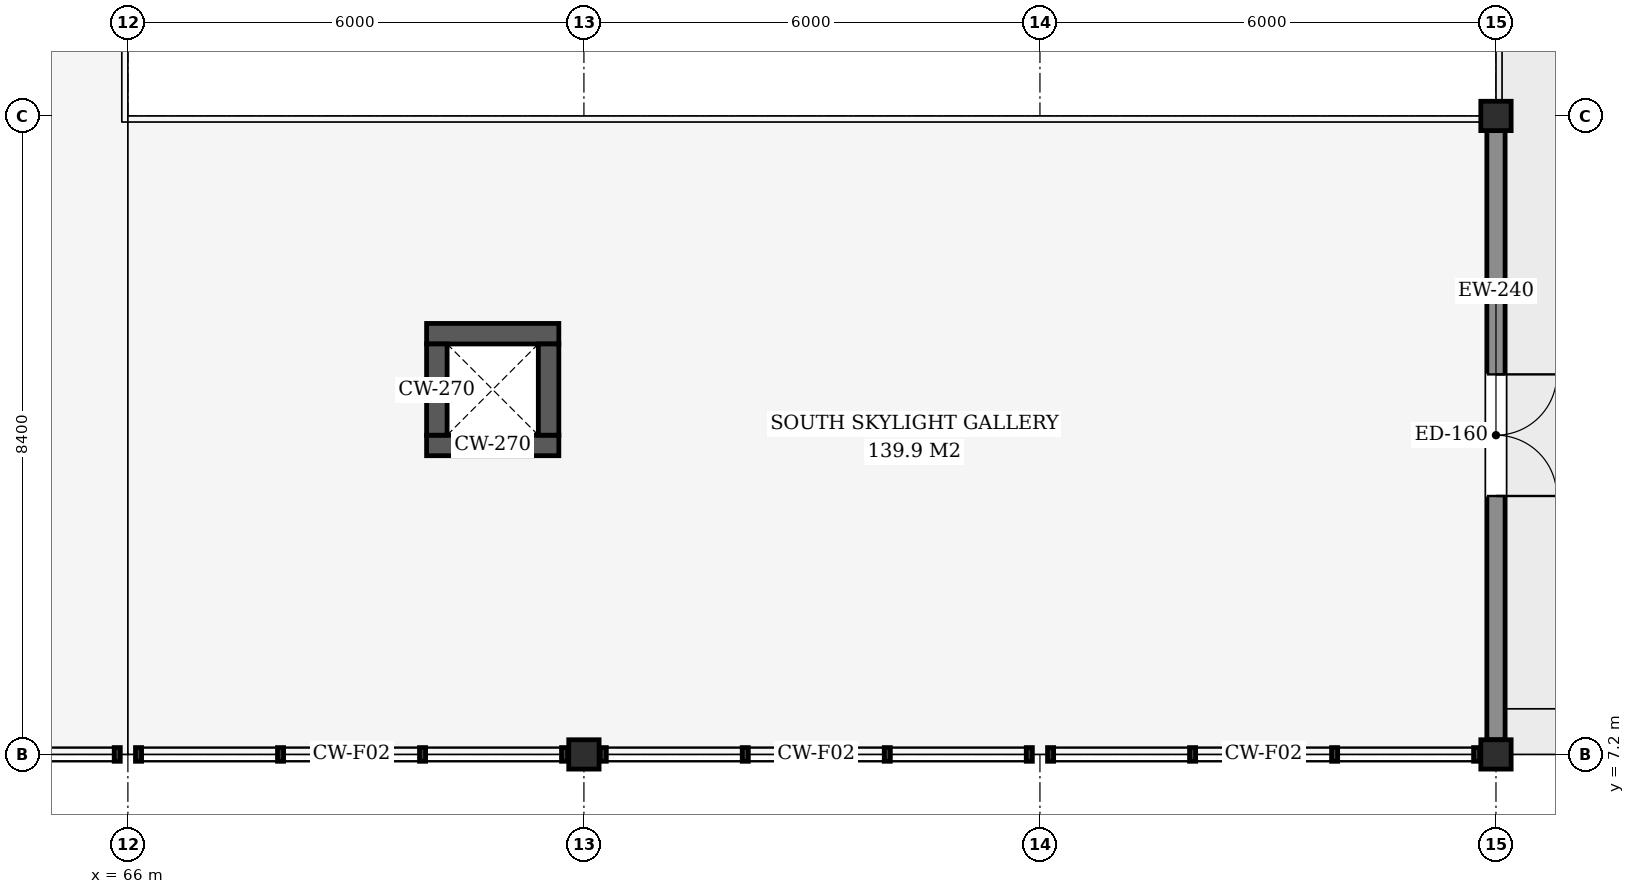
"""IFC4 building model, lengths in metres.
Left out: names, types, materials, properties, quantities, classifications, styles, units other than length and angle.
Written with IfcOpenShell. Run it as: python <this file> out.ifc"""

import sys

from ifc_helpers import new_model, si_unit, direction, frame, frame_2d, origin, origin_2d, place, context, subcontext, project, spatial, rectangle, i_section, extrude, element, fill, save


model = new_model("IFC4")
c1 = context("Model", 3, precision=1e-05, world=origin(), true_north=direction((0.0, 1.0)))
c2 = subcontext(c1, "Body", "Model", "MODEL_VIEW")
j1 = project(units=[si_unit("LENGTHUNIT", "METRE"), si_unit("PLANEANGLEUNIT", "RADIAN")], contexts=[c1])
p1 = place(None, origin())
s1 = spatial("IfcSite", under=j1, at=p1, CompositionType="ELEMENT")
p2 = place(p1, origin())
s2 = spatial("IfcBuilding", under=s1, at=p2, CompositionType="ELEMENT")
p3 = place(p2, frame((0.0, 0.0, 9.3)))
s3 = spatial("IfcBuildingStorey", under=s2, at=p3, CompositionType="ELEMENT", Elevation=9.3)
for number, where, z_axis, x_axis in (
    (1, (72.0, 7.2, 0.0), (0.0, 0.0, 1.0), (1.0, 0.0, 0.0)),
    (2, (84.0, 7.2, 0.0), (0.0, 0.0, 1.0), (1.0, 0.0, 0.0)),
    (3, (84.0, 15.6, 0.0), (0.0, 0.0, 1.0), (1.0, 0.0, 0.0)),
):
    element("IfcColumn", number, at=place(p3, frame(where, z_axis=z_axis, x_axis=x_axis)), inside=s3, PredefinedType="COLUMN", context=c2, shape_type="SweptSolid", body=[
        extrude(i_section(OverallWidth=0.399, OverallDepth=0.386, WebThickness=0.021, FlangeThickness=0.033, at=origin_2d()), origin(), (0.0, 0.0, 1.0), 4.37),
    ])
p4 = place(p3, frame((84.0, 15.407, 0.0), z_axis=(0.0, 0.0, 1.0), x_axis=(0.0, -1.0, 0.0)))
e4 = element("IfcWall", 4, at=p4, inside=s3, PredefinedType="SOLIDWALL", context=c2, shape_type="SweptSolid", body=[
    extrude(rectangle(XDim=8.014, YDim=0.24, at=frame_2d((4.007, 0.0))), origin(), (0.0, 0.0, 1.0), 3.738),
])
p5 = place(p4, frame((3.207, 0.0, 0.0)))
e5 = element("IfcOpeningElement", 5, at=p5, cuts=e4, PredefinedType="OPENING", context=c2, shape_type="SweptSolid", body=[
    extrude(rectangle(XDim=1.6, YDim=2.3, at=frame_2d((0.8, 1.15))), frame((0.0, 0.13, 0.0), z_axis=(0.0, -1.0, 0.0), x_axis=(1.0, 0.0, 0.0)), (0.0, 0.0, 1.0), 0.26),
])
for number, where, z_axis, x_axis in (
    (6, (69.93, 11.265, 0.0), (0.0, 0.0, 1.0), (1.0, 0.0, 0.0)),
    (7, (69.93, 12.735, 0.0), (0.0, 0.0, 1.0), (1.0, 0.0, 0.0)),
):
    element("IfcWall", number, at=place(p3, frame(where, z_axis=z_axis, x_axis=x_axis)), inside=s3, PredefinedType="SHEAR", context=c2, shape_type="SweptSolid", body=[
        extrude(rectangle(XDim=1.74, YDim=0.27, at=frame_2d((0.87, 0.0))), origin(), (0.0, 0.0, 1.0), 4.37),
    ])
for number, where, z_axis, x_axis in (
    (8, (70.065, 11.4, 0.0), (0.0, 0.0, 1.0), (0.0, 1.0, 0.0)),
    (9, (71.535, 11.4, 0.0), (0.0, 0.0, 1.0), (0.0, 1.0, 0.0)),
):
    element("IfcWall", number, at=place(p3, frame(where, z_axis=z_axis, x_axis=x_axis)), inside=s3, PredefinedType="SHEAR", context=c2, shape_type="SweptSolid", body=[
        extrude(rectangle(XDim=1.2, YDim=0.27, at=frame_2d((0.6, 0.0))), origin(), (0.0, 0.0, 1.0), 4.37),
    ])
p6 = place(p5, origin())
e10 = element("IfcDoor", 10, at=p6, inside=s3, OperationType="DOUBLE_DOOR_SINGLE_SWING", PredefinedType="DOOR", context=c2, shape_type="SweptSolid", body=[
    extrude(rectangle(XDim=1.6, YDim=2.3, at=frame_2d((0.8, 1.15))), frame((0.0, 0.025, 0.0), z_axis=(0.0, -1.0, 0.0), x_axis=(1.0, 0.0, 0.0)), (0.0, 0.0, 1.0), 0.05),
])
fill(e5, e10)
save(model, sys.argv[1])
